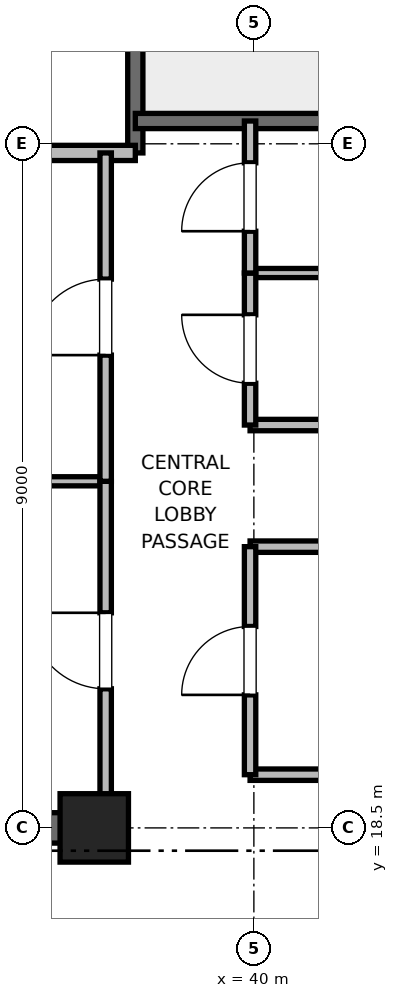
"""IFC4 building model, lengths in metres.
Left out: names, types, materials, properties, quantities, classifications, styles, units other than length and angle.
Written with IfcOpenShell. Run it as: python <this file> out.ifc"""

import sys

from ifc_helpers import new_model, si_unit, direction, frame, frame_2d, origin, origin_2d, place, context, subcontext, project, spatial, rectangle, extrude, element, fill, save


model = new_model("IFC4")
c1 = context("Model", 3, precision=1e-05, world=origin(), true_north=direction((0.0, 1.0)))
c2 = subcontext(c1, "Body", "Model", "MODEL_VIEW")
j1 = project(units=[si_unit("LENGTHUNIT", "METRE"), si_unit("PLANEANGLEUNIT", "RADIAN")], contexts=[c1])
p1 = place(None, origin())
s1 = spatial("IfcSite", under=j1, at=p1, CompositionType="ELEMENT")
p2 = place(p1, origin())
s2 = spatial("IfcBuilding", under=s1, at=p2, CompositionType="ELEMENT")
p3 = place(p2, frame((0.0, 0.0, 338.8)))
s3 = spatial("IfcBuildingStorey", under=s2, at=p3, CompositionType="ELEMENT", Elevation=338.8)
p4 = place(p3, frame((37.9, 18.5, 0.0), z_axis=(0.0, 0.0, 1.0), x_axis=(1.0, 0.0, 0.0)))
e1 = element("IfcColumn", 1, at=p4, inside=s3, PredefinedType="PILASTER", context=c2, shape_type="SweptSolid", body=[
    extrude(rectangle(XDim=0.9, YDim=0.9, at=origin_2d()), origin(), (0.0, 0.0, 1.0), 4.0),
])
p5 = place(p3, frame((29.0, 18.5, 0.0), z_axis=(0.0, 0.0, 1.0), x_axis=(1.0, 0.0, 0.0)))
e2 = element("IfcWall", 2, at=p5, inside=s3, PredefinedType="SHEAR", context=c2, shape_type="SweptSolid", body=[
    extrude(rectangle(XDim=9.2, YDim=0.4, at=frame_2d((4.6, 0.0))), origin(), (0.0, 0.0, 1.0), 3.7),
])
p6 = place(p3, frame((38.44, 27.38, 0.0), z_axis=(0.0, 0.0, 1.0), x_axis=(0.0, 1.0, 0.0)))
e3 = element("IfcWall", 3, at=p6, inside=s3, PredefinedType="SOLIDWALL", context=c2, shape_type="SweptSolid", body=[
    extrude(rectangle(XDim=8.87, YDim=0.2, at=frame_2d((4.435, 0.0))), origin(), (0.0, 0.0, 1.0), 3.7),
])
p7 = place(p3, frame((38.44, 27.8, 0.0), z_axis=(0.0, 0.0, 1.0), x_axis=(1.0, 0.0, 0.0)))
e4 = element("IfcWall", 4, at=p7, inside=s3, PredefinedType="SOLIDWALL", context=c2, shape_type="SweptSolid", body=[
    extrude(rectangle(XDim=3.32, YDim=0.2, at=frame_2d((1.66, 0.0))), origin(), (0.0, 0.0, 1.0), 3.7),
])
p8 = place(p3, frame((32.82, 27.38, 0.0), z_axis=(0.0, 0.0, 1.0), x_axis=(1.0, 0.0, 0.0)))
e5 = element("IfcWall", 5, at=p8, inside=s3, PredefinedType="PARTITIONING", context=c2, shape_type="SweptSolid", body=[
    extrude(rectangle(XDim=5.62, YDim=0.2, at=frame_2d((2.81, 0.0))), origin(), (0.0, 0.0, 1.0), 3.7),
])
for number, where, z_axis, x_axis in (
    (6, (39.95, 19.2, 0.0), (0.0, 0.0, 1.0), (1.0, 0.0, 0.0)),
    (7, (39.95, 22.2, 0.0), (0.0, 0.0, 1.0), (1.0, 0.0, 0.0)),
    (8, (39.95, 23.8, 0.0), (0.0, 0.0, 1.0), (1.0, 0.0, 0.0)),
):
    element("IfcWall", number, at=place(p3, frame(where, z_axis=z_axis, x_axis=x_axis)), inside=s3, PredefinedType="PARTITIONING", context=c2, shape_type="SweptSolid", body=[
        extrude(rectangle(XDim=1.81, YDim=0.15, at=frame_2d((0.905, 0.0))), origin(), (0.0, 0.0, 1.0), 2.85),
    ])
p9 = place(p3, frame((39.95, 25.8, 0.0), z_axis=(0.0, 0.0, 1.0), x_axis=(1.0, 0.0, 0.0)))
e9 = element("IfcWall", 9, at=p9, inside=s3, PredefinedType="PARTITIONING", context=c2, shape_type="SweptSolid", body=[
    extrude(rectangle(XDim=1.81, YDim=0.12, at=frame_2d((0.905, 0.0))), origin(), (0.0, 0.0, 1.0), 2.85),
])
p10 = place(p3, frame((39.95, 19.2, 0.0), z_axis=(0.0, 0.0, 1.0), x_axis=(0.0, 1.0, 0.0)))
e10 = element("IfcWall", 10, at=p10, inside=s3, PredefinedType="PARTITIONING", context=c2, shape_type="SweptSolid", body=[
    extrude(rectangle(XDim=3.0, YDim=0.15, at=frame_2d((1.5, 0.0))), origin(), (0.0, 0.0, 1.0), 2.85),
])
p11 = place(p10, frame((1.05, 0.0, 0.0)))
e11 = element("IfcOpeningElement", 11, at=p11, cuts=e10, PredefinedType="OPENING", context=c2, shape_type="SweptSolid", body=[
    extrude(rectangle(XDim=0.9, YDim=2.1, at=frame_2d((0.45, 1.05))), frame((0.0, 0.075, 0.0), z_axis=(0.0, -1.0, 0.0), x_axis=(1.0, 0.0, 0.0)), (0.0, 0.0, 1.0), 0.15),
])
p12 = place(p3, frame((39.95, 23.8, 0.0), z_axis=(0.0, 0.0, 1.0), x_axis=(0.0, 1.0, 0.0)))
e12 = element("IfcWall", 12, at=p12, inside=s3, PredefinedType="PARTITIONING", context=c2, shape_type="SweptSolid", body=[
    extrude(rectangle(XDim=2.0, YDim=0.15, at=frame_2d((1.0, 0.0))), origin(), (0.0, 0.0, 1.0), 2.85),
])
p13 = place(p12, frame((0.55, 0.0, 0.0)))
e13 = element("IfcOpeningElement", 13, at=p13, cuts=e12, PredefinedType="OPENING", context=c2, shape_type="SweptSolid", body=[
    extrude(rectangle(XDim=0.9, YDim=2.1, at=frame_2d((0.45, 1.05))), frame((0.0, 0.075, 0.0), z_axis=(0.0, -1.0, 0.0), x_axis=(1.0, 0.0, 0.0)), (0.0, 0.0, 1.0), 0.15),
])
p14 = place(p3, frame((39.95, 25.8, 0.0), z_axis=(0.0, 0.0, 1.0), x_axis=(0.0, 1.0, 0.0)))
e14 = element("IfcWall", 14, at=p14, inside=s3, PredefinedType="PARTITIONING", context=c2, shape_type="SweptSolid", body=[
    extrude(rectangle(XDim=2.0, YDim=0.15, at=frame_2d((1.0, 0.0))), origin(), (0.0, 0.0, 1.0), 2.85),
])
p15 = place(p14, frame((0.55, 0.0, 0.0)))
e15 = element("IfcOpeningElement", 15, at=p15, cuts=e14, PredefinedType="OPENING", context=c2, shape_type="SweptSolid", body=[
    extrude(rectangle(XDim=0.9, YDim=2.1, at=frame_2d((0.45, 1.05))), frame((0.0, 0.075, 0.0), z_axis=(0.0, -1.0, 0.0), x_axis=(1.0, 0.0, 0.0)), (0.0, 0.0, 1.0), 0.15),
])
p16 = place(p3, frame((32.82, 23.06, 0.0), z_axis=(0.0, 0.0, 1.0), x_axis=(1.0, 0.0, 0.0)))
e16 = element("IfcWall", 16, at=p16, inside=s3, PredefinedType="PARTITIONING", context=c2, shape_type="SweptSolid", body=[
    extrude(rectangle(XDim=5.23, YDim=0.12, at=frame_2d((2.615, 0.0))), origin(), (0.0, 0.0, 1.0), 2.85),
])
p17 = place(p3, frame((38.05, 18.6, 0.0), z_axis=(0.0, 0.0, 1.0), x_axis=(0.0, 1.0, 0.0)))
e17 = element("IfcWall", 17, at=p17, inside=s3, PredefinedType="PARTITIONING", context=c2, shape_type="SweptSolid", body=[
    extrude(rectangle(XDim=4.46, YDim=0.15, at=frame_2d((2.23, 0.0))), origin(), (0.0, 0.0, 1.0), 2.78),
])
p18 = place(p17, frame((1.73, 0.0, 0.0)))
e18 = element("IfcOpeningElement", 18, at=p18, cuts=e17, PredefinedType="OPENING", context=c2, shape_type="SweptSolid", body=[
    extrude(rectangle(XDim=1.0, YDim=2.15, at=frame_2d((0.5, 1.075))), frame((0.0, 0.075, 0.0), z_axis=(0.0, -1.0, 0.0), x_axis=(1.0, 0.0, 0.0)), (0.0, 0.0, 1.0), 0.15),
])
p19 = place(p3, frame((38.05, 23.06, 0.0), z_axis=(0.0, 0.0, 1.0), x_axis=(0.0, 1.0, 0.0)))
e19 = element("IfcWall", 19, at=p19, inside=s3, PredefinedType="PARTITIONING", context=c2, shape_type="SweptSolid", body=[
    extrude(rectangle(XDim=4.32, YDim=0.15, at=frame_2d((2.16, 0.0))), origin(), (0.0, 0.0, 1.0), 2.85),
])
p20 = place(p19, frame((1.66, 0.0, 0.0)))
e20 = element("IfcOpeningElement", 20, at=p20, cuts=e19, PredefinedType="OPENING", context=c2, shape_type="SweptSolid", body=[
    extrude(rectangle(XDim=1.0, YDim=2.15, at=frame_2d((0.5, 1.075))), frame((0.0, 0.075, 0.0), z_axis=(0.0, -1.0, 0.0), x_axis=(1.0, 0.0, 0.0)), (0.0, 0.0, 1.0), 0.15),
])
p21 = place(p11, origin())
e21 = element("IfcDoor", 21, at=p21, inside=s3, OperationType="SINGLE_SWING_LEFT", PredefinedType="DOOR", context=c2, shape_type="SweptSolid", body=[
    extrude(rectangle(XDim=0.9, YDim=2.1, at=frame_2d((0.45, 1.05))), frame((0.0, 0.025, 0.0), z_axis=(0.0, -1.0, 0.0), x_axis=(1.0, 0.0, 0.0)), (0.0, 0.0, 1.0), 0.05),
])
fill(e11, e21)
p22 = place(p13, origin())
e22 = element("IfcDoor", 22, at=p22, inside=s3, OperationType="SINGLE_SWING_RIGHT", PredefinedType="DOOR", context=c2, shape_type="SweptSolid", body=[
    extrude(rectangle(XDim=0.9, YDim=2.1, at=frame_2d((0.45, 1.05))), frame((0.0, 0.025, 0.0), z_axis=(0.0, -1.0, 0.0), x_axis=(1.0, 0.0, 0.0)), (0.0, 0.0, 1.0), 0.05),
])
fill(e13, e22)
p23 = place(p15, origin())
e23 = element("IfcDoor", 23, at=p23, inside=s3, OperationType="SINGLE_SWING_LEFT", PredefinedType="DOOR", context=c2, shape_type="SweptSolid", body=[
    extrude(rectangle(XDim=0.9, YDim=2.1, at=frame_2d((0.45, 1.05))), frame((0.0, 0.025, 0.0), z_axis=(0.0, -1.0, 0.0), x_axis=(1.0, 0.0, 0.0)), (0.0, 0.0, 1.0), 0.05),
])
fill(e15, e23)
p24 = place(p18, origin())
e24 = element("IfcDoor", 24, at=p24, inside=s3, OperationType="SINGLE_SWING_RIGHT", PredefinedType="DOOR", context=c2, shape_type="SweptSolid", body=[
    extrude(rectangle(XDim=1.0, YDim=2.15, at=frame_2d((0.5, 1.075))), frame((0.0, 0.025, 0.0), z_axis=(0.0, -1.0, 0.0), x_axis=(1.0, 0.0, 0.0)), (0.0, 0.0, 1.0), 0.05),
])
fill(e18, e24)
p25 = place(p20, origin())
e25 = element("IfcDoor", 25, at=p25, inside=s3, OperationType="SINGLE_SWING_LEFT", PredefinedType="DOOR", context=c2, shape_type="SweptSolid", body=[
    extrude(rectangle(XDim=1.0, YDim=2.15, at=frame_2d((0.5, 1.075))), frame((0.0, 0.025, 0.0), z_axis=(0.0, -1.0, 0.0), x_axis=(1.0, 0.0, 0.0)), (0.0, 0.0, 1.0), 0.05),
])
fill(e20, e25)
save(model, sys.argv[1])
